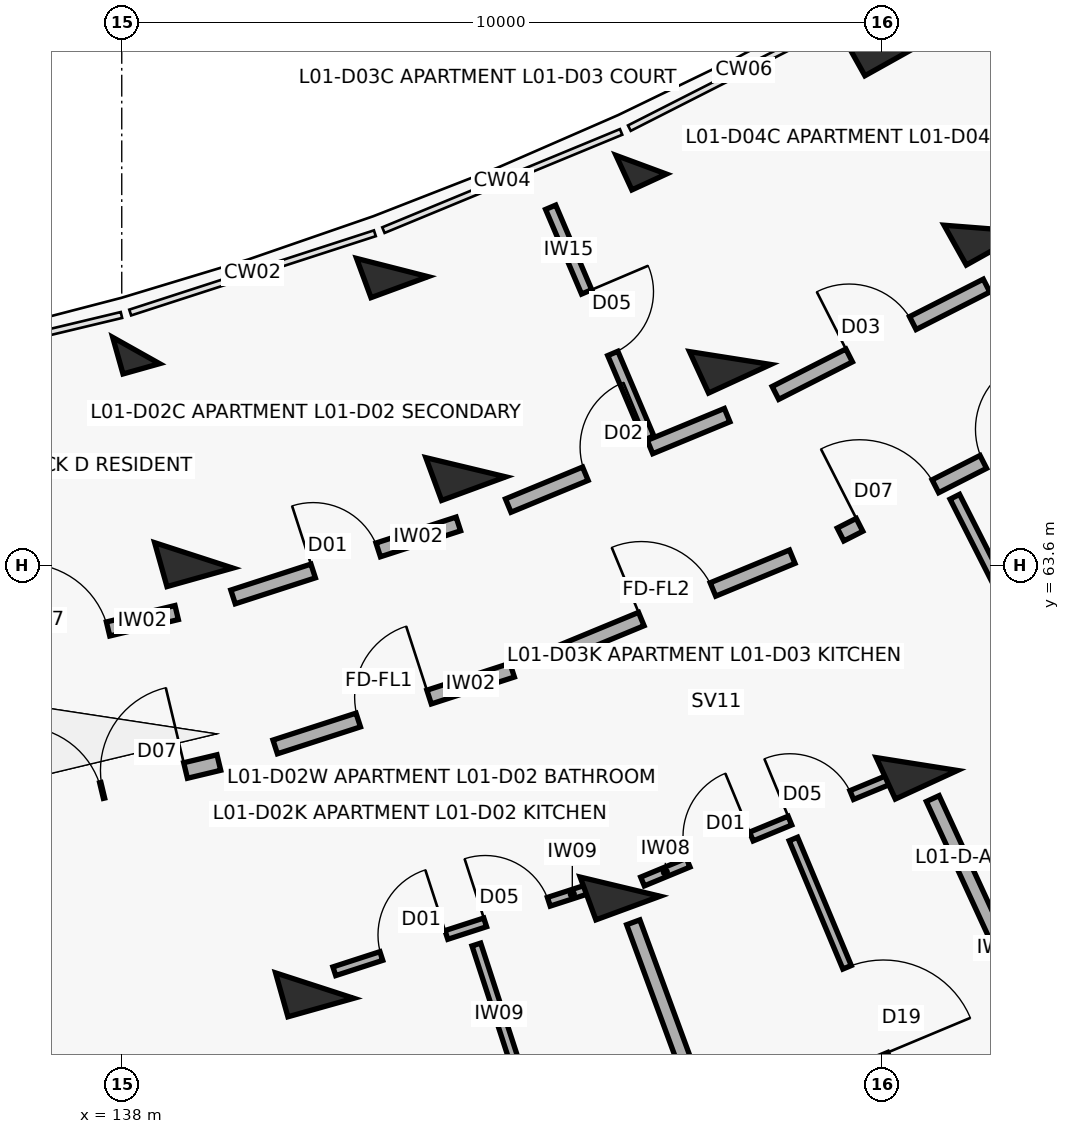
"""IFC4 building model, lengths in metres.
Left out: names, types, materials, properties, quantities, classifications, styles, units other than length and angle.
Written with IfcOpenShell. Run it as: python <this file> out.ifc"""

import sys

from ifc_helpers import new_model, si_unit, direction, frame, frame_2d, origin, origin_2d, place, context, subcontext, project, spatial, rectangle, extrude, element, fill, save


model = new_model("IFC4")
c1 = context("Model", 3, precision=1e-05, world=origin(), true_north=direction((0.0, 1.0)))
c2 = subcontext(c1, "Body", "Model", "MODEL_VIEW")
j1 = project(units=[si_unit("LENGTHUNIT", "METRE"), si_unit("PLANEANGLEUNIT", "RADIAN")], contexts=[c1])
p1 = place(None, origin())
s1 = spatial("IfcSite", under=j1, at=p1, CompositionType="ELEMENT")
p2 = place(p1, origin())
s2 = spatial("IfcBuilding", under=s1, at=p2, CompositionType="ELEMENT")
p3 = place(p2, frame((0.0, 0.0, 4.5)))
s3 = spatial("IfcBuildingStorey", under=s2, at=p3, CompositionType="ELEMENT", Elevation=4.5)
p4 = place(p3, frame((138.189, 66.423, 0.0), z_axis=(0.0, 0.0, 1.0), x_axis=(0.270600445976, -0.962691746426, 0.0)))
e1 = element("IfcColumn", 1, at=p4, inside=s3, PredefinedType="COLUMN", context=c2, shape_type="SweptSolid", body=[
    extrude(rectangle(XDim=0.5, YDim=0.5, at=origin_2d()), origin(), (0.0, 0.0, 1.0), 3.6),
])
for number, where, z_axis, x_axis in (
    (2, (138.947, 63.728, 0.0), (0.0, 0.0, 1.0), (0.271, -0.963, 0.0)),
    (3, (140.538, 58.067, 0.0), (0.0, 0.0, 1.0), (0.271, -0.963, 0.0)),
):
    element("IfcColumn", number, at=place(p3, frame(where, z_axis=z_axis, x_axis=x_axis)), inside=s3, PredefinedType="COLUMN", context=c2, shape_type="SweptSolid", body=[
        extrude(rectangle(XDim=0.6, YDim=0.9, at=origin_2d()), origin(), (0.0, 0.0, 1.0), 3.6),
    ])
p5 = place(p3, frame((141.56, 67.515, 0.0), z_axis=(0.0, 0.0, 1.0), x_axis=(0.345298198999, -0.93849302276, 0.0)))
e4 = element("IfcColumn", 4, at=p5, inside=s3, PredefinedType="COLUMN", context=c2, shape_type="SweptSolid", body=[
    extrude(rectangle(XDim=0.55, YDim=0.8, at=origin_2d()), origin(), (0.0, 0.0, 1.0), 3.6),
])
for number, where, z_axis, x_axis in (
    (5, (142.527, 64.887, 0.0), (0.0, 0.0, 1.0), (0.345, -0.938, 0.0)),
    (6, (144.557, 59.369, 0.0), (0.0, 0.0, 1.0), (0.345, -0.938, 0.0)),
):
    element("IfcColumn", number, at=place(p3, frame(where, z_axis=z_axis, x_axis=x_axis)), inside=s3, PredefinedType="COLUMN", context=c2, shape_type="SweptSolid", body=[
        extrude(rectangle(XDim=0.6, YDim=0.9, at=origin_2d()), origin(), (0.0, 0.0, 1.0), 3.6),
    ])
p6 = place(p3, frame((144.834, 68.868, 0.0), z_axis=(0.0, 0.0, 1.0), x_axis=(0.417867073801, -0.908508177527, 0.0)))
e7 = element("IfcColumn", 7, at=p6, inside=s3, PredefinedType="COLUMN", context=c2, shape_type="SweptSolid", body=[
    extrude(rectangle(XDim=0.5, YDim=0.5, at=origin_2d()), origin(), (0.0, 0.0, 1.0), 3.6),
])
for number, where, z_axis, x_axis in (
    (8, (146.004, 66.324, 0.0), (0.0, 0.0, 1.0), (0.418, -0.909, 0.0)),
    (9, (148.461, 60.982, 0.0), (0.0, 0.0, 1.0), (0.418, -0.909, 0.0)),
):
    element("IfcColumn", number, at=place(p3, frame(where, z_axis=z_axis, x_axis=x_axis)), inside=s3, PredefinedType="COLUMN", context=c2, shape_type="SweptSolid", body=[
        extrude(rectangle(XDim=0.6, YDim=0.9, at=origin_2d()), origin(), (0.0, 0.0, 1.0), 3.6),
    ])
p7 = place(p3, frame((147.992, 70.474, 0.0), z_axis=(0.0, 0.0, 1.0), x_axis=(0.487859659139, -0.87292207727, 0.0)))
e10 = element("IfcColumn", 10, at=p7, inside=s3, PredefinedType="COLUMN", context=c2, shape_type="SweptSolid", body=[
    extrude(rectangle(XDim=0.55, YDim=0.8, at=origin_2d()), origin(), (0.0, 0.0, 1.0), 3.6),
])
p8 = place(p3, frame((149.358, 68.03, 0.0), z_axis=(0.0, 0.0, 1.0), x_axis=(0.487859659139, -0.87292207727, 0.0)))
e11 = element("IfcColumn", 11, at=p8, inside=s3, PredefinedType="COLUMN", context=c2, shape_type="SweptSolid", body=[
    extrude(rectangle(XDim=0.6, YDim=0.9, at=origin_2d()), origin(), (0.0, 0.0, 1.0), 3.6),
])
p9 = place(p3, frame((136.227, 60.272, 0.0), z_axis=(0.0, 0.0, 1.0), x_axis=(0.972564346632, 0.232634029456, 0.0)))
e12 = element("IfcWall", 12, at=p9, inside=s3, PredefinedType="SOLIDWALL", context=c2, shape_type="SweptSolid", body=[
    extrude(rectangle(XDim=3.137, YDim=0.21, at=frame_2d((1.568, 0.0))), origin(), (0.0, 0.0, 1.0), 2.58),
])
p10 = place(p9, frame((0.45, 0.0, 0.0)))
e13 = element("IfcOpeningElement", 13, at=p10, cuts=e12, PredefinedType="OPENING", context=c2, shape_type="SweptSolid", body=[
    extrude(rectangle(XDim=1.1, YDim=2.15, at=frame_2d((0.55, 1.075))), frame((0.0, 0.115, 0.0), z_axis=(0.0, -1.0, 0.0), x_axis=(1.0, 0.0, 0.0)), (0.0, 0.0, 1.0), 0.23),
])
p11 = place(p9, frame((1.567, 0.0, 0.0)))
e14 = element("IfcOpeningElement", 14, at=p11, cuts=e12, PredefinedType="OPENING", context=c2, shape_type="SweptSolid", body=[
    extrude(rectangle(XDim=1.12, YDim=2.15, at=frame_2d((0.56, 1.075))), frame((0.0, 0.115, 0.0), z_axis=(0.0, -1.0, 0.0), x_axis=(1.0, 0.0, 0.0)), (0.0, 0.0, 1.0), 0.23),
])
p12 = place(p3, frame((135.828, 62.283, 0.0), z_axis=(0.0, 0.0, 1.0), x_axis=(0.972558314217, 0.232659247501, 0.0)))
e15 = element("IfcWall", 15, at=p12, inside=s3, PredefinedType="SOLIDWALL", context=c2, shape_type="SweptSolid", body=[
    extrude(rectangle(XDim=2.976, YDim=0.19, at=frame_2d((1.488, 0.0))), origin(), (0.0, 0.0, 1.0), 2.58),
])
p13 = place(p12, frame((0.928, 0.0, 0.0)))
e16 = element("IfcOpeningElement", 16, at=p13, cuts=e15, PredefinedType="OPENING", context=c2, shape_type="SweptSolid", body=[
    extrude(rectangle(XDim=1.12, YDim=2.15, at=frame_2d((0.56, 1.075))), frame((0.0, 0.105, 0.0), z_axis=(0.0, -1.0, 0.0), x_axis=(1.0, 0.0, 0.0)), (0.0, 0.0, 1.0), 0.21),
])
p14 = place(p3, frame((140.019, 61.208, 0.0), z_axis=(0.0, 0.0, 1.0), x_axis=(0.951323803878, 0.308193154005, 0.0)))
e17 = element("IfcWall", 17, at=p14, inside=s3, PredefinedType="SOLIDWALL", context=c2, shape_type="SweptSolid", body=[
    extrude(rectangle(XDim=3.277, YDim=0.19, at=frame_2d((1.639, 0.0))), origin(), (0.0, 0.0, 1.0), 2.58),
])
p15 = place(p14, frame((1.148, 0.0, 0.0)))
e18 = element("IfcOpeningElement", 18, at=p15, cuts=e17, PredefinedType="OPENING", context=c2, shape_type="SweptSolid", body=[
    extrude(rectangle(XDim=0.98, YDim=2.15, at=frame_2d((0.49, 1.075))), frame((0.0, 0.105, 0.0), z_axis=(0.0, -1.0, 0.0), x_axis=(1.0, 0.0, 0.0)), (0.0, 0.0, 1.0), 0.21),
])
p16 = place(p3, frame((139.464, 63.181, 0.0), z_axis=(0.0, 0.0, 1.0), x_axis=(0.951336474448, 0.308154040027, 0.0)))
e19 = element("IfcWall", 19, at=p16, inside=s3, PredefinedType="SOLIDWALL", context=c2, shape_type="SweptSolid", body=[
    extrude(rectangle(XDim=3.116, YDim=0.19, at=frame_2d((1.558, 0.0))), origin(), (0.0, 0.0, 1.0), 2.58),
])
p17 = place(p16, frame((1.108, 0.0, 0.0)))
e20 = element("IfcOpeningElement", 20, at=p17, cuts=e19, PredefinedType="OPENING", context=c2, shape_type="SweptSolid", body=[
    extrude(rectangle(XDim=0.9, YDim=2.1, at=frame_2d((0.45, 1.05))), frame((0.0, 0.105, 0.0), z_axis=(0.0, -1.0, 0.0), x_axis=(1.0, 0.0, 0.0)), (0.0, 0.0, 1.0), 0.21),
])
p18 = place(p3, frame((140.797, 58.256, 0.0), z_axis=(0.0, 0.0, 1.0), x_axis=(0.951329312261, 0.308176150331, 0.0)))
e21 = element("IfcWall", 21, at=p18, inside=s3, PredefinedType="PARTITIONING", context=c2, shape_type="SweptSolid", body=[
    extrude(rectangle(XDim=3.616, YDim=0.12, at=frame_2d((1.808, 0.0))), origin(), (0.0, 0.0, 1.0), 2.58),
])
p19 = place(p18, frame((0.65, 0.0, 0.0)))
e22 = element("IfcOpeningElement", 22, at=p19, cuts=e21, PredefinedType="OPENING", context=c2, shape_type="SweptSolid", body=[
    extrude(rectangle(XDim=0.9, YDim=2.1, at=frame_2d((0.45, 1.05))), frame((0.0, 0.07, 0.0), z_axis=(0.0, -1.0, 0.0), x_axis=(1.0, 0.0, 0.0)), (0.0, 0.0, 1.0), 0.14),
])
p20 = place(p18, frame((2.086, 0.0, 0.0)))
e23 = element("IfcOpeningElement", 23, at=p20, cuts=e21, PredefinedType="OPENING", context=c2, shape_type="SweptSolid", body=[
    extrude(rectangle(XDim=0.88, YDim=2.1, at=frame_2d((0.44, 1.05))), frame((0.0, 0.07, 0.0), z_axis=(0.0, -1.0, 0.0), x_axis=(1.0, 0.0, 0.0)), (0.0, 0.0, 1.0), 0.14),
])
p21 = place(p3, frame((142.665, 58.608, 0.0), z_axis=(0.0, 0.0, 1.0), x_axis=(0.309592146544, -0.950869445717, 0.0)))
e24 = element("IfcWall", 24, at=p21, inside=s3, PredefinedType="PARTITIONING", context=c2, shape_type="SweptSolid", body=[
    extrude(rectangle(XDim=5.05, YDim=0.12, at=frame_2d((2.525, 0.0))), origin(), (0.0, 0.0, 1.0), 2.58),
])
p22 = place(p21, frame((1.935, 0.0, 0.0)))
e25 = element("IfcOpeningElement", 25, at=p22, cuts=e24, PredefinedType="OPENING", context=c2, shape_type="SweptSolid", body=[
    extrude(rectangle(XDim=1.18, YDim=2.1, at=frame_2d((0.59, 1.05))), frame((0.0, 0.07, 0.0), z_axis=(0.0, -1.0, 0.0), x_axis=(1.0, 0.0, 0.0)), (0.0, 0.0, 1.0), 0.14),
])
p23 = place(p3, frame((143.793, 62.459, 0.0), z_axis=(0.0, 0.0, 1.0), x_axis=(0.924214561665, 0.381873596896, 0.0)))
e26 = element("IfcWall", 26, at=p23, inside=s3, PredefinedType="SOLIDWALL", context=c2, shape_type="SweptSolid", body=[
    extrude(rectangle(XDim=3.277, YDim=0.19, at=frame_2d((1.639, 0.0))), origin(), (0.0, 0.0, 1.0), 2.58),
])
p24 = place(p23, frame((1.128, 0.0, 0.0)))
e27 = element("IfcOpeningElement", 27, at=p24, cuts=e26, PredefinedType="OPENING", context=c2, shape_type="SweptSolid", body=[
    extrude(rectangle(XDim=1.02, YDim=2.15, at=frame_2d((0.51, 1.075))), frame((0.0, 0.105, 0.0), z_axis=(0.0, -1.0, 0.0), x_axis=(1.0, 0.0, 0.0)), (0.0, 0.0, 1.0), 0.21),
])
p25 = place(p3, frame((143.085, 64.383, 0.0), z_axis=(0.0, 0.0, 1.0), x_axis=(0.924213340202, 0.381876553081, 0.0)))
e28 = element("IfcWall", 28, at=p25, inside=s3, PredefinedType="SOLIDWALL", context=c2, shape_type="SweptSolid", body=[
    extrude(rectangle(XDim=3.116, YDim=0.19, at=frame_2d((1.558, 0.0))), origin(), (0.0, 0.0, 1.0), 2.58),
])
p26 = place(p25, frame((1.098, 0.0, 0.0)))
e29 = element("IfcOpeningElement", 29, at=p26, cuts=e28, PredefinedType="OPENING", context=c2, shape_type="SweptSolid", body=[
    extrude(rectangle(XDim=0.92, YDim=2.1, at=frame_2d((0.46, 1.05))), frame((0.0, 0.105, 0.0), z_axis=(0.0, -1.0, 0.0), x_axis=(1.0, 0.0, 0.0)), (0.0, 0.0, 1.0), 0.21),
])
p27 = place(p3, frame((143.643, 68.308, 0.0), z_axis=(0.0, 0.0, 1.0), x_axis=(0.391203300693, -0.920304285292, 0.0)))
e30 = element("IfcWall", 30, at=p27, inside=s3, PredefinedType="PARTITIONING", context=c2, shape_type="SweptSolid", body=[
    extrude(rectangle(XDim=3.3, YDim=0.145, at=frame_2d((1.65, 0.0))), origin(), (0.0, 0.0, 1.0), 2.58),
])
p28 = place(p27, frame((1.21, 0.0, 0.0)))
e31 = element("IfcOpeningElement", 31, at=p28, cuts=e30, PredefinedType="OPENING", context=c2, shape_type="SweptSolid", body=[
    extrude(rectangle(XDim=0.88, YDim=2.1, at=frame_2d((0.44, 1.05))), frame((0.0, 0.083, 0.0), z_axis=(0.0, -1.0, 0.0), x_axis=(1.0, 0.0, 0.0)), (0.0, 0.0, 1.0), 0.165),
])
p29 = place(p3, frame((144.852, 59.437, 0.0), z_axis=(0.0, 0.0, 1.0), x_axis=(0.924217547919, 0.381866369453, 0.0)))
e32 = element("IfcWall", 32, at=p29, inside=s3, PredefinedType="PARTITIONING", context=c2, shape_type="SweptSolid", body=[
    extrude(rectangle(XDim=3.628, YDim=0.125, at=frame_2d((1.814, 0.0))), origin(), (0.0, 0.0, 1.0), 2.58),
])
p30 = place(p29, frame((0.65, 0.0, 0.0)))
e33 = element("IfcOpeningElement", 33, at=p30, cuts=e32, PredefinedType="OPENING", context=c2, shape_type="SweptSolid", body=[
    extrude(rectangle(XDim=0.9, YDim=2.1, at=frame_2d((0.45, 1.05))), frame((0.0, 0.073, 0.0), z_axis=(0.0, -1.0, 0.0), x_axis=(1.0, 0.0, 0.0)), (0.0, 0.0, 1.0), 0.145),
])
p31 = place(p29, frame((2.098, 0.0, 0.0)))
e34 = element("IfcOpeningElement", 34, at=p31, cuts=e32, PredefinedType="OPENING", context=c2, shape_type="SweptSolid", body=[
    extrude(rectangle(XDim=0.88, YDim=2.1, at=frame_2d((0.44, 1.05))), frame((0.0, 0.073, 0.0), z_axis=(0.0, -1.0, 0.0), x_axis=(1.0, 0.0, 0.0)), (0.0, 0.0, 1.0), 0.145),
])
p32 = place(p3, frame((146.837, 59.996, 0.0), z_axis=(0.0, 0.0, 1.0), x_axis=(0.385846225752, -0.922563108992, 0.0)))
e35 = element("IfcWall", 35, at=p32, inside=s3, PredefinedType="PARTITIONING", context=c2, shape_type="SweptSolid", body=[
    extrude(rectangle(XDim=4.9, YDim=0.12, at=frame_2d((2.45, 0.0))), origin(), (0.0, 0.0, 1.0), 2.58),
])
p33 = place(p32, frame((1.83, 0.0, 0.0)))
e36 = element("IfcOpeningElement", 36, at=p33, cuts=e35, PredefinedType="OPENING", context=c2, shape_type="SweptSolid", body=[
    extrude(rectangle(XDim=1.24, YDim=2.1, at=frame_2d((0.62, 1.05))), frame((0.0, 0.07, 0.0), z_axis=(0.0, -1.0, 0.0), x_axis=(1.0, 0.0, 0.0)), (0.0, 0.0, 1.0), 0.14),
])
p34 = place(p3, frame((144.73, 58.9, 0.0), z_axis=(0.0, 0.0, 1.0), x_axis=(0.345273579683, -0.938502080537, 0.0)))
e37 = element("IfcWall", 37, at=p34, inside=s3, PredefinedType="SOLIDWALL", context=c2, shape_type="SweptSolid", body=[
    extrude(rectangle(XDim=4.35, YDim=0.185, at=frame_2d((2.175, 0.0))), origin(), (0.0, 0.0, 1.0), 2.58),
])
p35 = place(p3, frame((147.457, 64.003, 0.0), z_axis=(0.0, 0.0, 1.0), x_axis=(0.891412167565, 0.45319349898, 0.0)))
e38 = element("IfcWall", 38, at=p35, inside=s3, PredefinedType="SOLIDWALL", context=c2, shape_type="SweptSolid", body=[
    extrude(rectangle(XDim=3.277, YDim=0.19, at=frame_2d((1.639, 0.0))), origin(), (0.0, 0.0, 1.0), 2.58),
])
p36 = place(p35, frame((0.28, 0.0, 0.0)))
e39 = element("IfcOpeningElement", 39, at=p36, cuts=e38, PredefinedType="OPENING", context=c2, shape_type="SweptSolid", body=[
    extrude(rectangle(XDim=1.12, YDim=2.15, at=frame_2d((0.56, 1.075))), frame((0.0, 0.105, 0.0), z_axis=(0.0, -1.0, 0.0), x_axis=(1.0, 0.0, 0.0)), (0.0, 0.0, 1.0), 0.21),
])
p37 = place(p35, frame((2.107, 0.0, 0.0)))
e40 = element("IfcOpeningElement", 40, at=p37, cuts=e38, PredefinedType="OPENING", context=c2, shape_type="SweptSolid", body=[
    extrude(rectangle(XDim=0.95, YDim=2.1, at=frame_2d((0.475, 1.05))), frame((0.0, 0.105, 0.0), z_axis=(0.0, -1.0, 0.0), x_axis=(1.0, 0.0, 0.0)), (0.0, 0.0, 1.0), 0.21),
])
p38 = place(p3, frame((146.6, 65.865, 0.0), z_axis=(0.0, 0.0, 1.0), x_axis=(0.891414101388, 0.453189695212, 0.0)))
e41 = element("IfcWall", 41, at=p38, inside=s3, PredefinedType="SOLIDWALL", context=c2, shape_type="SweptSolid", body=[
    extrude(rectangle(XDim=3.116, YDim=0.19, at=frame_2d((1.558, 0.0))), origin(), (0.0, 0.0, 1.0), 2.58),
])
p39 = place(p38, frame((1.088, 0.0, 0.0)))
e42 = element("IfcOpeningElement", 42, at=p39, cuts=e41, PredefinedType="OPENING", context=c2, shape_type="SweptSolid", body=[
    extrude(rectangle(XDim=0.94, YDim=2.1, at=frame_2d((0.47, 1.05))), frame((0.0, 0.105, 0.0), z_axis=(0.0, -1.0, 0.0), x_axis=(1.0, 0.0, 0.0)), (0.0, 0.0, 1.0), 0.21),
])
p40 = place(p3, frame((148.96, 64.499, 0.0), z_axis=(0.0, 0.0, 1.0), x_axis=(0.451912010816, -0.892062517137, 0.0)))
e43 = element("IfcWall", 43, at=p40, inside=s3, PredefinedType="PARTITIONING", context=c2, shape_type="SweptSolid", body=[
    extrude(rectangle(XDim=7.95, YDim=0.14, at=frame_2d((3.975, 0.0))), origin(), (0.0, 0.0, 1.0), 2.58),
])
p41 = place(p40, frame((6.05, 0.0, 0.0)))
e44 = element("IfcOpeningElement", 44, at=p41, cuts=e43, PredefinedType="OPENING", context=c2, shape_type="SweptSolid", body=[
    extrude(rectangle(XDim=0.92, YDim=2.1, at=frame_2d((0.46, 1.05))), frame((0.0, 0.08, 0.0), z_axis=(0.0, -1.0, 0.0), x_axis=(1.0, 0.0, 0.0)), (0.0, 0.0, 1.0), 0.16),
])
p42 = place(p3, frame((148.67, 60.528, 0.0), z_axis=(0.0, 0.0, 1.0), x_axis=(0.417837051164, -0.908521985796, 0.0)))
e45 = element("IfcWall", 45, at=p42, inside=s3, PredefinedType="SOLIDWALL", context=c2, shape_type="SweptSolid", body=[
    extrude(rectangle(XDim=4.35, YDim=0.185, at=frame_2d((2.175, 0.0))), origin(), (0.0, 0.0, 1.0), 2.58),
])
p43 = place(p10, origin())
e46 = element("IfcDoor", 46, at=p43, inside=s3, OperationType="SINGLE_SWING_LEFT", PredefinedType="DOOR", context=c2, shape_type="SweptSolid", body=[
    extrude(rectangle(XDim=1.1, YDim=2.15, at=frame_2d((0.55, 1.075))), frame((0.0, 0.025, 0.0), z_axis=(0.0, -1.0, 0.0), x_axis=(1.0, 0.0, 0.0)), (0.0, 0.0, 1.0), 0.05),
])
fill(e13, e46)
p44 = place(p11, origin())
e47 = element("IfcDoor", 47, at=p44, inside=s3, OperationType="SINGLE_SWING_RIGHT", PredefinedType="DOOR", context=c2, shape_type="SweptSolid", body=[
    extrude(rectangle(XDim=1.12, YDim=2.15, at=frame_2d((0.56, 1.075))), frame((0.0, 0.025, 0.0), z_axis=(0.0, -1.0, 0.0), x_axis=(1.0, 0.0, 0.0)), (0.0, 0.0, 1.0), 0.05),
])
fill(e14, e47)
p45 = place(p13, origin())
e48 = element("IfcDoor", 48, at=p45, inside=s3, OperationType="SINGLE_SWING_LEFT", PredefinedType="DOOR", context=c2, shape_type="SweptSolid", body=[
    extrude(rectangle(XDim=1.12, YDim=2.15, at=frame_2d((0.56, 1.075))), frame((0.0, 0.025, 0.0), z_axis=(0.0, -1.0, 0.0), x_axis=(1.0, 0.0, 0.0)), (0.0, 0.0, 1.0), 0.05),
])
fill(e16, e48)
p46 = place(p15, origin())
e49 = element("IfcDoor", 49, at=p46, inside=s3, OperationType="SINGLE_SWING_RIGHT", PredefinedType="DOOR", context=c2, shape_type="SweptSolid", body=[
    extrude(rectangle(XDim=0.98, YDim=2.15, at=frame_2d((0.49, 1.075))), frame((0.0, 0.025, 0.0), z_axis=(0.0, -1.0, 0.0), x_axis=(1.0, 0.0, 0.0)), (0.0, 0.0, 1.0), 0.05),
])
fill(e18, e49)
p47 = place(p17, origin())
e50 = element("IfcDoor", 50, at=p47, inside=s3, OperationType="SINGLE_SWING_LEFT", PredefinedType="DOOR", context=c2, shape_type="SweptSolid", body=[
    extrude(rectangle(XDim=0.9, YDim=2.1, at=frame_2d((0.45, 1.05))), frame((0.0, 0.025, 0.0), z_axis=(0.0, -1.0, 0.0), x_axis=(1.0, 0.0, 0.0)), (0.0, 0.0, 1.0), 0.05),
])
fill(e20, e50)
p48 = place(p19, origin())
e51 = element("IfcDoor", 51, at=p48, inside=s3, OperationType="SINGLE_SWING_RIGHT", PredefinedType="DOOR", context=c2, shape_type="SweptSolid", body=[
    extrude(rectangle(XDim=0.9, YDim=2.1, at=frame_2d((0.45, 1.05))), frame((0.0, 0.025, 0.0), z_axis=(0.0, -1.0, 0.0), x_axis=(1.0, 0.0, 0.0)), (0.0, 0.0, 1.0), 0.05),
])
fill(e22, e51)
p49 = place(p20, origin())
e52 = element("IfcDoor", 52, at=p49, inside=s3, OperationType="SINGLE_SWING_LEFT", PredefinedType="DOOR", context=c2, shape_type="SweptSolid", body=[
    extrude(rectangle(XDim=0.88, YDim=2.1, at=frame_2d((0.44, 1.05))), frame((0.0, 0.025, 0.0), z_axis=(0.0, -1.0, 0.0), x_axis=(1.0, 0.0, 0.0)), (0.0, 0.0, 1.0), 0.05),
])
fill(e23, e52)
p50 = place(p24, origin())
e53 = element("IfcDoor", 53, at=p50, inside=s3, OperationType="SINGLE_SWING_LEFT", PredefinedType="DOOR", context=c2, shape_type="SweptSolid", body=[
    extrude(rectangle(XDim=1.02, YDim=2.15, at=frame_2d((0.51, 1.075))), frame((0.0, 0.025, 0.0), z_axis=(0.0, -1.0, 0.0), x_axis=(1.0, 0.0, 0.0)), (0.0, 0.0, 1.0), 0.05),
])
fill(e27, e53)
p51 = place(p26, origin())
e54 = element("IfcDoor", 54, at=p51, inside=s3, OperationType="SINGLE_SWING_RIGHT", PredefinedType="DOOR", context=c2, shape_type="SweptSolid", body=[
    extrude(rectangle(XDim=0.92, YDim=2.1, at=frame_2d((0.46, 1.05))), frame((0.0, 0.025, 0.0), z_axis=(0.0, -1.0, 0.0), x_axis=(1.0, 0.0, 0.0)), (0.0, 0.0, 1.0), 0.05),
])
fill(e29, e54)
p52 = place(p28, origin())
e55 = element("IfcDoor", 55, at=p52, inside=s3, OperationType="SINGLE_SWING_LEFT", PredefinedType="DOOR", context=c2, shape_type="SweptSolid", body=[
    extrude(rectangle(XDim=0.88, YDim=2.1, at=frame_2d((0.44, 1.05))), frame((0.0, 0.025, 0.0), z_axis=(0.0, -1.0, 0.0), x_axis=(1.0, 0.0, 0.0)), (0.0, 0.0, 1.0), 0.05),
])
fill(e31, e55)
p53 = place(p30, origin())
e56 = element("IfcDoor", 56, at=p53, inside=s3, OperationType="SINGLE_SWING_RIGHT", PredefinedType="DOOR", context=c2, shape_type="SweptSolid", body=[
    extrude(rectangle(XDim=0.9, YDim=2.1, at=frame_2d((0.45, 1.05))), frame((0.0, 0.025, 0.0), z_axis=(0.0, -1.0, 0.0), x_axis=(1.0, 0.0, 0.0)), (0.0, 0.0, 1.0), 0.05),
])
fill(e33, e56)
p54 = place(p31, origin())
e57 = element("IfcDoor", 57, at=p54, inside=s3, OperationType="SINGLE_SWING_LEFT", PredefinedType="DOOR", context=c2, shape_type="SweptSolid", body=[
    extrude(rectangle(XDim=0.88, YDim=2.1, at=frame_2d((0.44, 1.05))), frame((0.0, 0.025, 0.0), z_axis=(0.0, -1.0, 0.0), x_axis=(1.0, 0.0, 0.0)), (0.0, 0.0, 1.0), 0.05),
])
fill(e34, e57)
p55 = place(p33, origin())
e58 = element("IfcDoor", 58, at=p55, inside=s3, OperationType="SINGLE_SWING_RIGHT", PredefinedType="DOOR", context=c2, shape_type="SweptSolid", body=[
    extrude(rectangle(XDim=1.24, YDim=2.1, at=frame_2d((0.62, 1.05))), frame((0.0, 0.025, 0.0), z_axis=(0.0, -1.0, 0.0), x_axis=(1.0, 0.0, 0.0)), (0.0, 0.0, 1.0), 0.05),
])
fill(e36, e58)
p56 = place(p36, origin())
e59 = element("IfcDoor", 59, at=p56, inside=s3, OperationType="SINGLE_SWING_LEFT", PredefinedType="DOOR", context=c2, shape_type="SweptSolid", body=[
    extrude(rectangle(XDim=1.12, YDim=2.15, at=frame_2d((0.56, 1.075))), frame((0.0, 0.025, 0.0), z_axis=(0.0, -1.0, 0.0), x_axis=(1.0, 0.0, 0.0)), (0.0, 0.0, 1.0), 0.05),
])
fill(e39, e59)
p57 = place(p37, origin())
e60 = element("IfcDoor", 60, at=p57, inside=s3, OperationType="SINGLE_SWING_RIGHT", PredefinedType="DOOR", context=c2, shape_type="SweptSolid", body=[
    extrude(rectangle(XDim=0.95, YDim=2.1, at=frame_2d((0.475, 1.05))), frame((0.0, 0.025, 0.0), z_axis=(0.0, -1.0, 0.0), x_axis=(1.0, 0.0, 0.0)), (0.0, 0.0, 1.0), 0.05),
])
fill(e40, e60)
p58 = place(p39, origin())
e61 = element("IfcDoor", 61, at=p58, inside=s3, OperationType="SINGLE_SWING_LEFT", PredefinedType="DOOR", context=c2, shape_type="SweptSolid", body=[
    extrude(rectangle(XDim=0.94, YDim=2.1, at=frame_2d((0.47, 1.05))), frame((0.0, 0.025, 0.0), z_axis=(0.0, -1.0, 0.0), x_axis=(1.0, 0.0, 0.0)), (0.0, 0.0, 1.0), 0.05),
])
fill(e42, e61)
save(model, sys.argv[1])
